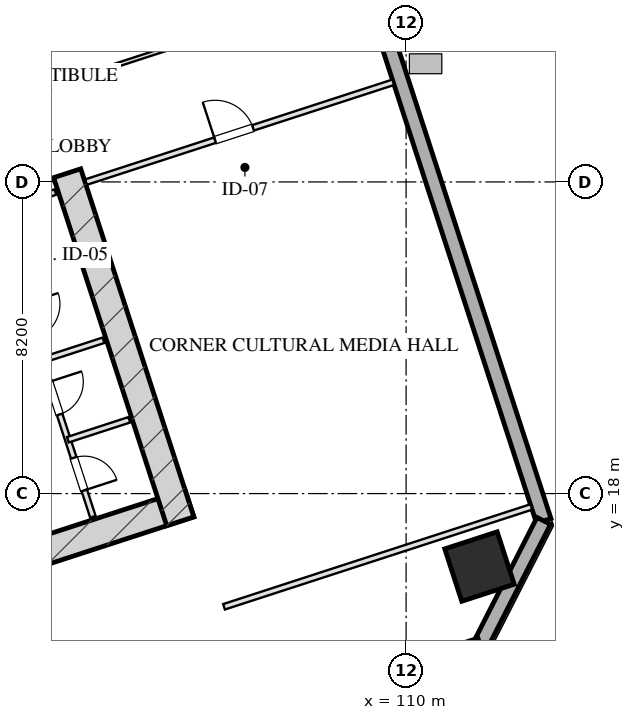
"""IFC4 building model, lengths in metres.
Left out: names, types, materials, properties, quantities, classifications, styles, units other than length and angle.
Written with IfcOpenShell. Run it as: python <this file> out.ifc"""

import sys

from ifc_helpers import new_model, si_unit, direction, frame, frame_2d, origin, origin_2d, place, context, subcontext, project, spatial, rectangle, hollow_rectangle, extrude, element, fill, save


model = new_model("IFC4")
c1 = context("Model", 3, precision=1e-05, world=origin(), true_north=direction((0.0, 1.0)))
c2 = subcontext(c1, "Body", "Model", "MODEL_VIEW")
j1 = project(units=[si_unit("LENGTHUNIT", "METRE"), si_unit("PLANEANGLEUNIT", "RADIAN")], contexts=[c1])
p1 = place(None, origin())
s1 = spatial("IfcSite", under=j1, at=p1, CompositionType="ELEMENT")
p2 = place(p1, origin())
s2 = spatial("IfcBuilding", under=s1, at=p2, CompositionType="ELEMENT")
p3 = place(p2, frame((0.0, 0.0, 78.2)))
s3 = spatial("IfcBuildingStorey", under=s2, at=p3, CompositionType="ELEMENT", Elevation=78.2)
p4 = place(p3, frame((88.559, 12.629, 0.0), z_axis=(0.0, 0.0, 1.0), x_axis=(0.951056072937, 0.309018358888, 0.0)))
e1 = element("IfcWall", 1, at=p4, inside=s3, PredefinedType="SHEAR", context=c2, shape_type="SweptSolid", body=[
    extrude(rectangle(XDim=16.55, YDim=0.75, at=frame_2d((8.275, 0.0))), origin(), (0.0, 0.0, 1.0), 3.45),
])
p5 = place(p3, frame((101.082, 26.429, 0.0), z_axis=(0.0, 0.0, 1.0), x_axis=(0.309016134813, -0.951056795583, 0.0)))
e2 = element("IfcWall", 2, at=p5, inside=s3, PredefinedType="SHEAR", context=c2, shape_type="SweptSolid", body=[
    extrude(rectangle(XDim=9.63, YDim=0.75, at=frame_2d((4.815, 0.0))), origin(), (0.0, 0.0, 1.0), 3.45),
])
p6 = place(p3, frame((111.931, 16.08, 0.0), z_axis=(0.0, 0.0, 1.0), x_axis=(0.951056516295, 0.309016994375, 0.0)))
e3 = element("IfcColumn", 3, at=p6, inside=s3, PredefinedType="COLUMN", context=c2, shape_type="SweptSolid", body=[
    extrude(hollow_rectangle(XDim=1.45, YDim=1.45, WallThickness=0.05, at=origin_2d()), origin(), (0.0, 0.0, 1.0), 3.451),
])
p7 = place(p3, frame((99.284, 61.41, 0.0), z_axis=(0.0, 0.0, 1.0), x_axis=(0.309017542002, -0.95105633836, 0.0)))
e4 = element("IfcWall", 4, at=p7, inside=s3, PredefinedType="SOLIDWALL", context=c2, shape_type="SweptSolid", body=[
    extrude(rectangle(XDim=46.4, YDim=0.4, at=frame_2d((23.2, 0.0))), origin(), (0.0, 0.0, 1.0), 2.61),
])
p8 = place(p7, frame((19.596, 0.0, 0.0)))
e5 = element("IfcOpeningElement", 5, at=p8, cuts=e4, PredefinedType="OPENING", context=c2, shape_type="SweptSolid", body=[
    extrude(rectangle(XDim=1.1, YDim=2.15, at=frame_2d((0.55, 1.075))), frame((0.0, 0.21, 0.0), z_axis=(0.0, -1.0, 0.0), x_axis=(1.0, 0.0, 0.0)), (0.0, 0.0, 1.0), 0.42),
])
p9 = place(p3, frame((113.623, 17.281, 0.0), z_axis=(0.0, 0.0, 1.0), x_axis=(-0.454026238093, -0.890988313685, 0.0)))
e6 = element("IfcWall", 6, at=p9, inside=s3, PredefinedType="SOLIDWALL", context=c2, shape_type="SweptSolid", body=[
    extrude(rectangle(XDim=3.677, YDim=0.4, at=frame_2d((1.838, 0.0))), origin(), (0.0, 0.0, 1.0), 2.61),
])
p10 = place(p3, frame((111.953, 14.005, 0.0), z_axis=(0.0, 0.0, 1.0), x_axis=(-0.95105505922, -0.309021478754, 0.0)))
e7 = element("IfcWall", 7, at=p10, inside=s3, PredefinedType="SOLIDWALL", context=c2, shape_type="SweptSolid", body=[
    extrude(rectangle(XDim=29.4, YDim=0.4, at=frame_2d((14.7, 0.0))), origin(), (0.0, 0.0, 1.0), 2.61),
])
p11 = place(p3, frame((97.727, 24.944, 0.0), z_axis=(0.0, 0.0, 1.0), x_axis=(0.951036872128, 0.309077446369, 0.0)))
e8 = element("IfcWall", 8, at=p11, inside=s3, PredefinedType="PARTITIONING", context=c2, shape_type="SweptSolid", body=[
    extrude(rectangle(XDim=3.2, YDim=0.15, at=frame_2d((1.6, 0.0))), origin(), (0.0, 0.0, 1.0), 3.175),
])
p12 = place(p11, frame((0.22, 0.0, 0.0)))
e9 = element("IfcOpeningElement", 9, at=p12, cuts=e8, PredefinedType="OPENING", context=c2, shape_type="SweptSolid", body=[
    extrude(rectangle(XDim=0.95, YDim=2.05, at=frame_2d((0.475, 1.025))), frame((0.0, 0.085, 0.0), z_axis=(0.0, -1.0, 0.0), x_axis=(1.0, 0.0, 0.0)), (0.0, 0.0, 1.0), 0.17),
])
p13 = place(p3, frame((99.153, 25.408, 0.0), z_axis=(0.0, 0.0, 1.0), x_axis=(0.309016001439, -0.951056838919, 0.0)))
e10 = element("IfcWall", 10, at=p13, inside=s3, PredefinedType="PARTITIONING", context=c2, shape_type="SweptSolid", body=[
    extrude(rectangle(XDim=8.43, YDim=0.15, at=frame_2d((4.215, 0.0))), origin(), (0.0, 0.0, 1.0), 3.175),
])
p14 = place(p13, frame((2.55, 0.0, 0.0)))
e11 = element("IfcOpeningElement", 11, at=p14, cuts=e10, PredefinedType="OPENING", context=c2, shape_type="SweptSolid", body=[
    extrude(rectangle(XDim=0.95, YDim=2.05, at=frame_2d((0.475, 1.025))), frame((0.0, 0.085, 0.0), z_axis=(0.0, -1.0, 0.0), x_axis=(1.0, 0.0, 0.0)), (0.0, 0.0, 1.0), 0.17),
])
p15 = place(p13, frame((4.7, 0.0, 0.0)))
e12 = element("IfcOpeningElement", 12, at=p15, cuts=e10, PredefinedType="OPENING", context=c2, shape_type="SweptSolid", body=[
    extrude(rectangle(XDim=0.9, YDim=2.05, at=frame_2d((0.45, 1.025))), frame((0.0, 0.085, 0.0), z_axis=(0.0, -1.0, 0.0), x_axis=(1.0, 0.0, 0.0)), (0.0, 0.0, 1.0), 0.17),
])
p16 = place(p13, frame((6.8, 0.0, 0.0)))
e13 = element("IfcOpeningElement", 13, at=p16, cuts=e10, PredefinedType="OPENING", context=c2, shape_type="SweptSolid", body=[
    extrude(rectangle(XDim=0.9, YDim=2.05, at=frame_2d((0.45, 1.025))), frame((0.0, 0.085, 0.0), z_axis=(0.0, -1.0, 0.0), x_axis=(1.0, 0.0, 0.0)), (0.0, 0.0, 1.0), 0.17),
])
p17 = place(p3, frame((100.42, 21.509, 0.0), z_axis=(0.0, 0.0, 1.0), x_axis=(0.951040401051, 0.309066587596, 0.0)))
e14 = element("IfcWall", 14, at=p17, inside=s3, PredefinedType="PARTITIONING", context=c2, shape_type="SweptSolid", body=[
    extrude(rectangle(XDim=1.7, YDim=0.15, at=frame_2d((0.85, 0.0))), origin(), (0.0, 0.0, 1.0), 3.175),
])
p18 = place(p3, frame((101.1, 19.416, 0.0), z_axis=(0.0, 0.0, 1.0), x_axis=(0.951054116971, 0.309024378638, 0.0)))
e15 = element("IfcWall", 15, at=p18, inside=s3, PredefinedType="PARTITIONING", context=c2, shape_type="SweptSolid", body=[
    extrude(rectangle(XDim=1.7, YDim=0.15, at=frame_2d((0.85, 0.0))), origin(), (0.0, 0.0, 1.0), 3.175),
])
p19 = place(p3, frame((105.209, 15.021, 0.0), z_axis=(0.0, 0.0, 1.0), x_axis=(0.951054329824, 0.309023723562, 0.0)))
e16 = element("IfcWall", 16, at=p19, inside=s3, PredefinedType="PARTITIONING", context=c2, shape_type="SweptSolid", body=[
    extrude(rectangle(XDim=8.5, YDim=0.15, at=frame_2d((4.25, 0.0))), origin(), (0.0, 0.0, 1.0), 3.175),
])
p20 = place(p3, frame((101.578, 26.196, 0.0), z_axis=(0.0, 0.0, 1.0), x_axis=(0.951062770994, 0.308997743729, 0.0)))
e17 = element("IfcWall", 17, at=p20, inside=s3, PredefinedType="PARTITIONING", context=c2, shape_type="SweptSolid", body=[
    extrude(rectangle(XDim=8.5, YDim=0.15, at=frame_2d((4.25, 0.0))), origin(), (0.0, 0.0, 1.0), 3.175),
])
p21 = place(p20, frame((3.57, 0.0, 0.0)))
e18 = element("IfcOpeningElement", 18, at=p21, cuts=e17, PredefinedType="OPENING", context=c2, shape_type="SweptSolid", body=[
    extrude(rectangle(XDim=1.05, YDim=2.05, at=frame_2d((0.525, 1.025))), frame((0.0, 0.085, 0.0), z_axis=(0.0, -1.0, 0.0), x_axis=(1.0, 0.0, 0.0)), (0.0, 0.0, 1.0), 0.17),
])
p22 = place(p3, frame((91.834, 25.848, 0.0), z_axis=(0.0, 0.0, 1.0), x_axis=(0.951055746746, 0.309019362795, 0.0)))
e19 = element("IfcWall", 19, at=p22, inside=s3, PredefinedType="MOVABLE", context=c2, shape_type="SweptSolid", body=[
    extrude(rectangle(XDim=17.875, YDim=0.1, at=frame_2d((8.938, 0.0))), origin(), (0.0, 0.0, 1.0), 3.175),
])
p23 = place(p15, origin())
e20 = element("IfcDoor", 20, at=p23, inside=s3, OperationType="SINGLE_SWING_LEFT", PredefinedType="DOOR", context=c2, shape_type="SweptSolid", body=[
    extrude(rectangle(XDim=0.9, YDim=2.05, at=frame_2d((0.45, 1.025))), frame((0.0, 0.025, 0.0), z_axis=(0.0, -1.0, 0.0), x_axis=(1.0, 0.0, 0.0)), (0.0, 0.0, 1.0), 0.05),
])
fill(e12, e20)
p24 = place(p16, origin())
e21 = element("IfcDoor", 21, at=p24, inside=s3, OperationType="SINGLE_SWING_RIGHT", PredefinedType="DOOR", context=c2, shape_type="SweptSolid", body=[
    extrude(rectangle(XDim=0.9, YDim=2.05, at=frame_2d((0.45, 1.025))), frame((0.0, 0.025, 0.0), z_axis=(0.0, -1.0, 0.0), x_axis=(1.0, 0.0, 0.0)), (0.0, 0.0, 1.0), 0.05),
])
fill(e13, e21)
p25 = place(p21, origin())
e22 = element("IfcDoor", 22, at=p25, inside=s3, OperationType="SINGLE_SWING_LEFT", PredefinedType="DOOR", context=c2, shape_type="SweptSolid", body=[
    extrude(rectangle(XDim=1.05, YDim=2.05, at=frame_2d((0.525, 1.025))), frame((0.0, 0.025, 0.0), z_axis=(0.0, -1.0, 0.0), x_axis=(1.0, 0.0, 0.0)), (0.0, 0.0, 1.0), 0.05),
])
fill(e18, e22)
save(model, sys.argv[1])
